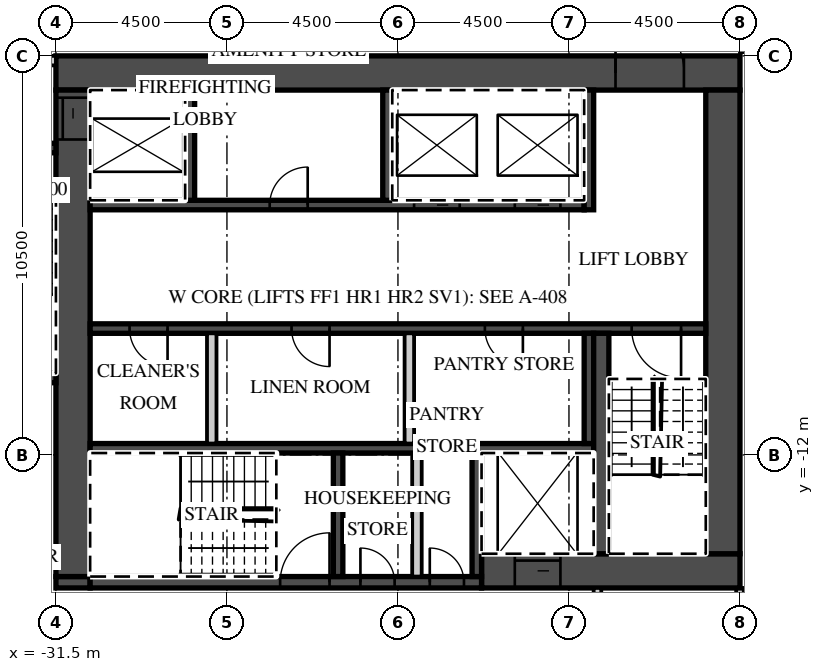
"""IFC4 building model, lengths in metres.
Left out: names, types, materials, properties, quantities, classifications, styles, units other than length and angle.
Written with IfcOpenShell. Run it as: python <this file> out.ifc"""

import sys

from ifc_helpers import new_model, si_unit, direction, frame, frame_2d, origin, place, context, subcontext, project, spatial, rectangle, extrude, element, fill, save


model = new_model("IFC4")
c1 = context("Model", 3, precision=1e-05, world=origin(), true_north=direction((0.0, 1.0)))
c2 = subcontext(c1, "Body", "Model", "MODEL_VIEW")
j1 = project(units=[si_unit("LENGTHUNIT", "METRE"), si_unit("PLANEANGLEUNIT", "RADIAN")], contexts=[c1])
p1 = place(None, origin())
s1 = spatial("IfcSite", under=j1, at=p1, CompositionType="ELEMENT")
p2 = place(p1, origin())
s2 = spatial("IfcBuilding", under=s1, at=p2, CompositionType="ELEMENT")
p3 = place(p2, frame((0.0, 0.0, 301.5)))
s3 = spatial("IfcBuildingStorey", under=s2, at=p3, CompositionType="ELEMENT", Elevation=301.5)
p4 = place(p3, frame((-13.5, -21.396, 0.0), z_axis=(0.0, 0.0, 1.0), x_axis=(0.0, 1.0, 0.0)))
e1 = element("IfcWall", 1, at=p4, inside=s3, PredefinedType="PARTITIONING", context=c2, shape_type="SweptSolid", body=[
    extrude(rectangle(XDim=5.896, YDim=0.2, at=frame_2d((2.948, 0.0))), origin(), (0.0, 0.0, 1.0), 3.02),
])
p5 = place(p3, frame((-13.5, -1.3, 0.0), z_axis=(0.0, 0.0, 1.0), x_axis=(1.0, 0.0, 0.0)))
e2 = element("IfcWall", 2, at=p5, inside=s3, PredefinedType="PARTITIONING", context=c2, shape_type="SweptSolid", body=[
    extrude(rectangle(XDim=50.293, YDim=0.2, at=frame_2d((25.146, 0.0))), origin(), (0.0, 0.0, 1.0), 3.02),
])
p6 = place(p5, frame((0.575, 0.0, 0.0)))
e3 = element("IfcOpeningElement", 3, at=p6, cuts=e2, PredefinedType="OPENING", context=c2, shape_type="SweptSolid", body=[
    extrude(rectangle(XDim=1.0, YDim=2.1, at=frame_2d((0.5, 1.05))), frame((0.0, 0.11, 0.0), z_axis=(0.0, -1.0, 0.0), x_axis=(1.0, 0.0, 0.0)), (0.0, 0.0, 1.0), 0.22),
])
p7 = place(p5, frame((6.938, 0.0, 0.0)))
e4 = element("IfcOpeningElement", 4, at=p7, cuts=e2, PredefinedType="OPENING", context=c2, shape_type="SweptSolid", body=[
    extrude(rectangle(XDim=1.2, YDim=2.1, at=frame_2d((0.6, 1.05))), frame((0.0, 0.11, 0.0), z_axis=(0.0, -1.0, 0.0), x_axis=(1.0, 0.0, 0.0)), (0.0, 0.0, 1.0), 0.22),
])
p8 = place(p5, frame((16.45, 0.0, 0.0)))
e5 = element("IfcOpeningElement", 5, at=p8, cuts=e2, PredefinedType="OPENING", context=c2, shape_type="SweptSolid", body=[
    extrude(rectangle(XDim=1.0, YDim=2.1, at=frame_2d((0.5, 1.05))), frame((0.0, 0.11, 0.0), z_axis=(0.0, -1.0, 0.0), x_axis=(1.0, 0.0, 0.0)), (0.0, 0.0, 1.0), 0.22),
])
p9 = place(p5, frame((20.925, 0.0, 0.0)))
e6 = element("IfcOpeningElement", 6, at=p9, cuts=e2, PredefinedType="OPENING", context=c2, shape_type="SweptSolid", body=[
    extrude(rectangle(XDim=1.0, YDim=2.1, at=frame_2d((0.5, 1.05))), frame((0.0, 0.11, 0.0), z_axis=(0.0, -1.0, 0.0), x_axis=(1.0, 0.0, 0.0)), (0.0, 0.0, 1.0), 0.22),
])
p10 = place(p5, frame((24.938, 0.0, 0.0)))
e7 = element("IfcOpeningElement", 7, at=p10, cuts=e2, PredefinedType="OPENING", context=c2, shape_type="SweptSolid", body=[
    extrude(rectangle(XDim=1.2, YDim=2.1, at=frame_2d((0.6, 1.05))), frame((0.0, 0.11, 0.0), z_axis=(0.0, -1.0, 0.0), x_axis=(1.0, 0.0, 0.0)), (0.0, 0.0, 1.0), 0.22),
])
p11 = place(p5, frame((32.075, 0.0, 0.0)))
e8 = element("IfcOpeningElement", 8, at=p11, cuts=e2, PredefinedType="OPENING", context=c2, shape_type="SweptSolid", body=[
    extrude(rectangle(XDim=1.0, YDim=2.1, at=frame_2d((0.5, 1.05))), frame((0.0, 0.11, 0.0), z_axis=(0.0, -1.0, 0.0), x_axis=(1.0, 0.0, 0.0)), (0.0, 0.0, 1.0), 0.22),
])
p12 = place(p5, frame((38.925, 0.0, 0.0)))
e9 = element("IfcOpeningElement", 9, at=p12, cuts=e2, PredefinedType="OPENING", context=c2, shape_type="SweptSolid", body=[
    extrude(rectangle(XDim=1.0, YDim=2.1, at=frame_2d((0.5, 1.05))), frame((0.0, 0.11, 0.0), z_axis=(0.0, -1.0, 0.0), x_axis=(1.0, 0.0, 0.0)), (0.0, 0.0, 1.0), 0.22),
])
p13 = place(p5, frame((45.862, 0.0, 0.0)))
e10 = element("IfcOpeningElement", 10, at=p13, cuts=e2, PredefinedType="OPENING", context=c2, shape_type="SweptSolid", body=[
    extrude(rectangle(XDim=1.2, YDim=2.1, at=frame_2d((0.6, 1.05))), frame((0.0, 0.11, 0.0), z_axis=(0.0, -1.0, 0.0), x_axis=(1.0, 0.0, 0.0)), (0.0, 0.0, 1.0), 0.22),
])
p14 = place(p3, frame((-31.5, -1.95, 0.0), z_axis=(0.0, 0.0, 1.0), x_axis=(1.0, 0.0, 0.0)))
e11 = element("IfcWall", 11, at=p14, inside=s3, PredefinedType="SHEAR", context=c2, shape_type="SweptSolid", body=[
    extrude(rectangle(XDim=18.0, YDim=0.9, at=frame_2d((9.0, 0.0))), origin(), (0.0, 0.0, 1.0), 3.02),
])
p15 = place(p14, frame((14.725, 0.0, 0.0)))
e12 = element("IfcOpeningElement", 12, at=p15, cuts=e11, PredefinedType="OPENING", context=c2, shape_type="SweptSolid", body=[
    extrude(rectangle(XDim=1.8, YDim=2.1, at=frame_2d((0.9, 1.05))), frame((0.0, 0.46, 0.0), z_axis=(0.0, -1.0, 0.0), x_axis=(1.0, 0.0, 0.0)), (0.0, 0.0, 1.0), 0.92),
])
p16 = place(p3, frame((-20.3, -15.05, 0.0), z_axis=(0.0, 0.0, 1.0), x_axis=(1.0, 0.0, 0.0)))
e13 = element("IfcWall", 13, at=p16, inside=s3, PredefinedType="SHEAR", context=c2, shape_type="SweptSolid", body=[
    extrude(rectangle(XDim=6.8, YDim=0.9, at=frame_2d((3.4, 0.0))), origin(), (0.0, 0.0, 1.0), 3.02),
])
p17 = place(p16, frame((0.875, 0.0, 0.0)))
e14 = element("IfcOpeningElement", 14, at=p17, cuts=e13, PredefinedType="OPENING", context=c2, shape_type="SweptSolid", body=[
    extrude(rectangle(XDim=1.2, YDim=2.1, at=frame_2d((0.6, 1.05))), frame((0.0, 0.46, 0.0), z_axis=(0.0, -1.0, 0.0), x_axis=(1.0, 0.0, 0.0)), (0.0, 0.0, 1.0), 0.92),
])
p18 = place(p3, frame((-31.5, -15.35, 0.0), z_axis=(0.0, 0.0, 1.0), x_axis=(1.0, 0.0, 0.0)))
e15 = element("IfcWall", 15, at=p18, inside=s3, PredefinedType="SHEAR", context=c2, shape_type="SweptSolid", body=[
    extrude(rectangle(XDim=0.9, YDim=0.3, at=frame_2d((0.45, 0.0))), origin(), (0.0, 0.0, 1.0), 3.02),
])
p19 = place(p3, frame((-30.6, -15.35, 0.0), z_axis=(0.0, 0.0, 1.0), x_axis=(1.0, 0.0, 0.0)))
e16 = element("IfcWall", 16, at=p19, inside=s3, PredefinedType="SHEAR", context=c2, shape_type="SweptSolid", body=[
    extrude(rectangle(XDim=10.3, YDim=0.3, at=frame_2d((5.15, 0.0))), origin(), (0.0, 0.0, 1.0), 3.02),
])
p20 = place(p19, frame((5.0, 0.0, 0.0)))
e17 = element("IfcOpeningElement", 17, at=p20, cuts=e16, PredefinedType="OPENING", context=c2, shape_type="SweptSolid", body=[
    extrude(rectangle(XDim=1.3, YDim=2.1, at=frame_2d((0.65, 1.05))), frame((0.0, 0.16, 0.0), z_axis=(0.0, -1.0, 0.0), x_axis=(1.0, 0.0, 0.0)), (0.0, 0.0, 1.0), 0.32),
])
p21 = place(p19, frame((7.113, 0.0, 0.0)))
e18 = element("IfcOpeningElement", 18, at=p21, cuts=e16, PredefinedType="OPENING", context=c2, shape_type="SweptSolid", body=[
    extrude(rectangle(XDim=0.9, YDim=2.1, at=frame_2d((0.45, 1.05))), frame((0.0, 0.16, 0.0), z_axis=(0.0, -1.0, 0.0), x_axis=(1.0, 0.0, 0.0)), (0.0, 0.0, 1.0), 0.32),
])
p22 = place(p19, frame((8.938, 0.0, 0.0)))
e19 = element("IfcOpeningElement", 19, at=p22, cuts=e16, PredefinedType="OPENING", context=c2, shape_type="SweptSolid", body=[
    extrude(rectangle(XDim=0.9, YDim=2.1, at=frame_2d((0.45, 1.05))), frame((0.0, 0.16, 0.0), z_axis=(0.0, -1.0, 0.0), x_axis=(1.0, 0.0, 0.0)), (0.0, 0.0, 1.0), 0.32),
])
p23 = place(p3, frame((-31.05, -15.2, 0.0), z_axis=(0.0, 0.0, 1.0), x_axis=(0.0, 1.0, 0.0)))
e20 = element("IfcWall", 20, at=p23, inside=s3, PredefinedType="SHEAR", context=c2, shape_type="SweptSolid", body=[
    extrude(rectangle(XDim=12.8, YDim=0.9, at=frame_2d((6.4, 0.0))), origin(), (0.0, 0.0, 1.0), 3.02),
])
p24 = place(p23, frame((11.5, 0.0, 0.0)))
e21 = element("IfcOpeningElement", 21, at=p24, cuts=e20, PredefinedType="OPENING", context=c2, shape_type="SweptSolid", body=[
    extrude(rectangle(XDim=1.1, YDim=2.1, at=frame_2d((0.55, 1.05))), frame((0.0, 0.46, 0.0), z_axis=(0.0, -1.0, 0.0), x_axis=(1.0, 0.0, 0.0)), (0.0, 0.0, 1.0), 0.92),
])
p25 = place(p3, frame((-13.95, -14.6, 0.0), z_axis=(0.0, 0.0, 1.0), x_axis=(0.0, 1.0, 0.0)))
e22 = element("IfcWall", 22, at=p25, inside=s3, PredefinedType="SHEAR", context=c2, shape_type="SweptSolid", body=[
    extrude(rectangle(XDim=12.2, YDim=0.9, at=frame_2d((6.1, 0.0))), origin(), (0.0, 0.0, 1.0), 3.02),
])
p26 = place(p3, frame((-30.6, -5.425, 0.0), z_axis=(0.0, 0.0, 1.0), x_axis=(1.0, 0.0, 0.0)))
e23 = element("IfcWall", 23, at=p26, inside=s3, PredefinedType="SHEAR", context=c2, shape_type="SweptSolid", body=[
    extrude(rectangle(XDim=13.0, YDim=0.25, at=frame_2d((6.5, 0.0))), origin(), (0.0, 0.0, 1.0), 3.02),
])
p27 = place(p26, frame((8.525, 0.0, 0.0)))
e24 = element("IfcOpeningElement", 24, at=p27, cuts=e23, PredefinedType="OPENING", context=c2, shape_type="SweptSolid", body=[
    extrude(rectangle(XDim=1.2, YDim=2.1, at=frame_2d((0.6, 1.05))), frame((0.0, 0.135, 0.0), z_axis=(0.0, -1.0, 0.0), x_axis=(1.0, 0.0, 0.0)), (0.0, 0.0, 1.0), 0.27),
])
p28 = place(p26, frame((11.175, 0.0, 0.0)))
e25 = element("IfcOpeningElement", 25, at=p28, cuts=e23, PredefinedType="OPENING", context=c2, shape_type="SweptSolid", body=[
    extrude(rectangle(XDim=1.2, YDim=2.1, at=frame_2d((0.6, 1.05))), frame((0.0, 0.135, 0.0), z_axis=(0.0, -1.0, 0.0), x_axis=(1.0, 0.0, 0.0)), (0.0, 0.0, 1.0), 0.27),
])
p29 = place(p26, frame((4.725, 0.0, 0.0)))
e26 = element("IfcOpeningElement", 26, at=p29, cuts=e23, PredefinedType="OPENING", context=c2, shape_type="SweptSolid", body=[
    extrude(rectangle(XDim=1.0, YDim=2.1, at=frame_2d((0.5, 1.05))), frame((0.0, 0.135, 0.0), z_axis=(0.0, -1.0, 0.0), x_axis=(1.0, 0.0, 0.0)), (0.0, 0.0, 1.0), 0.27),
])
p30 = place(p3, frame((-17.475, -5.55, 0.0), z_axis=(0.0, 0.0, 1.0), x_axis=(0.0, 1.0, 0.0)))
e27 = element("IfcWall", 27, at=p30, inside=s3, PredefinedType="SHEAR", context=c2, shape_type="SweptSolid", body=[
    extrude(rectangle(XDim=3.15, YDim=0.25, at=frame_2d((1.575, 0.0))), origin(), (0.0, 0.0, 1.0), 3.02),
])
for number, where, z_axis, x_axis in (
    (28, (-27.975, -5.3, 0.0), (0.0, 0.0, 1.0), (0.0, 1.0, 0.0)),
    (29, (-22.775, -5.3, 0.0), (0.0, 0.0, 1.0), (0.0, 1.0, 0.0)),
):
    element("IfcWall", number, at=place(p3, frame(where, z_axis=z_axis, x_axis=x_axis)), inside=s3, PredefinedType="SHEAR", context=c2, shape_type="SweptSolid", body=[
        extrude(rectangle(XDim=2.9, YDim=0.25, at=frame_2d((1.45, 0.0))), origin(), (0.0, 0.0, 1.0), 3.02),
    ])
p31 = place(p3, frame((-30.6, -8.675, 0.0), z_axis=(0.0, 0.0, 1.0), x_axis=(1.0, 0.0, 0.0)))
e30 = element("IfcWall", 30, at=p31, inside=s3, PredefinedType="SHEAR", context=c2, shape_type="SweptSolid", body=[
    extrude(rectangle(XDim=16.2, YDim=0.25, at=frame_2d((8.1, 0.0))), origin(), (0.0, 0.0, 1.0), 3.02),
])
p32 = place(p31, frame((14.25, 0.0, 0.0)))
e31 = element("IfcOpeningElement", 31, at=p32, cuts=e30, PredefinedType="OPENING", context=c2, shape_type="SweptSolid", body=[
    extrude(rectangle(XDim=1.3, YDim=2.1, at=frame_2d((0.65, 1.05))), frame((0.0, 0.135, 0.0), z_axis=(0.0, -1.0, 0.0), x_axis=(1.0, 0.0, 0.0)), (0.0, 0.0, 1.0), 0.27),
])
p33 = place(p31, frame((1.038, 0.0, 0.0)))
e32 = element("IfcOpeningElement", 32, at=p33, cuts=e30, PredefinedType="OPENING", context=c2, shape_type="SweptSolid", body=[
    extrude(rectangle(XDim=1.0, YDim=2.1, at=frame_2d((0.5, 1.05))), frame((0.0, 0.135, 0.0), z_axis=(0.0, -1.0, 0.0), x_axis=(1.0, 0.0, 0.0)), (0.0, 0.0, 1.0), 0.27),
])
p34 = place(p31, frame((5.3, 0.0, 0.0)))
e33 = element("IfcOpeningElement", 33, at=p34, cuts=e30, PredefinedType="OPENING", context=c2, shape_type="SweptSolid", body=[
    extrude(rectangle(XDim=1.0, YDim=2.1, at=frame_2d((0.5, 1.05))), frame((0.0, 0.135, 0.0), z_axis=(0.0, -1.0, 0.0), x_axis=(1.0, 0.0, 0.0)), (0.0, 0.0, 1.0), 0.27),
])
p35 = place(p31, frame((10.387, 0.0, 0.0)))
e34 = element("IfcOpeningElement", 34, at=p35, cuts=e30, PredefinedType="OPENING", context=c2, shape_type="SweptSolid", body=[
    extrude(rectangle(XDim=1.0, YDim=2.1, at=frame_2d((0.5, 1.05))), frame((0.0, 0.135, 0.0), z_axis=(0.0, -1.0, 0.0), x_axis=(1.0, 0.0, 0.0)), (0.0, 0.0, 1.0), 0.27),
])
p36 = place(p3, frame((-30.6, -11.825, 0.0), z_axis=(0.0, 0.0, 1.0), x_axis=(1.0, 0.0, 0.0)))
e35 = element("IfcWall", 35, at=p36, inside=s3, PredefinedType="SHEAR", context=c2, shape_type="SweptSolid", body=[
    extrude(rectangle(XDim=13.25, YDim=0.25, at=frame_2d((6.625, 0.0))), origin(), (0.0, 0.0, 1.0), 3.02),
])
p37 = place(p3, frame((-17.475, -11.7, 0.0), z_axis=(0.0, 0.0, 1.0), x_axis=(0.0, 1.0, 0.0)))
e36 = element("IfcWall", 36, at=p37, inside=s3, PredefinedType="SHEAR", context=c2, shape_type="SweptSolid", body=[
    extrude(rectangle(XDim=2.9, YDim=0.25, at=frame_2d((1.45, 0.0))), origin(), (0.0, 0.0, 1.0), 3.02),
])
for number, where, z_axis, x_axis in (
    (37, (-27.4, -11.7, 0.0), (0.0, 0.0, 1.0), (0.0, 1.0, 0.0)),
    (38, (-22.2, -11.7, 0.0), (0.0, 0.0, 1.0), (0.0, 1.0, 0.0)),
):
    element("IfcWall", number, at=place(p3, frame(where, z_axis=z_axis, x_axis=x_axis)), inside=s3, PredefinedType="PARTITIONING", context=c2, shape_type="SweptSolid", body=[
        extrude(rectangle(XDim=2.9, YDim=0.25, at=frame_2d((1.45, 0.0))), origin(), (0.0, 0.0, 1.0), 3.02),
    ])
p38 = place(p3, frame((-17.15, -14.6, 0.0), z_axis=(0.0, 0.0, 1.0), x_axis=(0.0, 1.0, 0.0)))
e39 = element("IfcWall", 39, at=p38, inside=s3, PredefinedType="SHEAR", context=c2, shape_type="SweptSolid", body=[
    extrude(rectangle(XDim=5.8, YDim=0.4, at=frame_2d((2.9, 0.0))), origin(), (0.0, 0.0, 1.0), 3.02),
])
for number, where, z_axis, x_axis in (
    (40, (-20.425, -15.2, 0.0), (0.0, 0.0, 1.0), (0.0, 1.0, 0.0)),
    (41, (-24.075, -15.2, 0.0), (0.0, 0.0, 1.0), (0.0, 1.0, 0.0)),
):
    element("IfcWall", number, at=place(p3, frame(where, z_axis=z_axis, x_axis=x_axis)), inside=s3, PredefinedType="SHEAR", context=c2, shape_type="SweptSolid", body=[
        extrude(rectangle(XDim=3.25, YDim=0.25, at=frame_2d((1.625, 0.0))), origin(), (0.0, 0.0, 1.0), 3.02),
    ])
p39 = place(p3, frame((-22.0, -15.2, 0.0), z_axis=(0.0, 0.0, 1.0), x_axis=(0.0, 1.0, 0.0)))
e42 = element("IfcWall", 42, at=p39, inside=s3, PredefinedType="PARTITIONING", context=c2, shape_type="SweptSolid", body=[
    extrude(rectangle(XDim=3.25, YDim=0.25, at=frame_2d((1.625, 0.0))), origin(), (0.0, 0.0, 1.0), 3.02),
])
p40 = place(p3, frame((-39.627, -1.625, 0.0), z_axis=(0.0, 0.0, 1.0), x_axis=(1.0, 0.0, 0.0)))
e43 = element("IfcWall", 43, at=p40, inside=s3, PredefinedType="PARTITIONING", context=c2, shape_type="SweptSolid", body=[
    extrude(rectangle(XDim=8.127, YDim=0.25, at=frame_2d((4.063, 0.0))), origin(), (0.0, 0.0, 1.0), 3.02),
])
p41 = place(p40, frame((6.202, 0.0, 0.0)))
e44 = element("IfcOpeningElement", 44, at=p41, cuts=e43, PredefinedType="OPENING", context=c2, shape_type="SweptSolid", body=[
    extrude(rectangle(XDim=1.3, YDim=2.1, at=frame_2d((0.65, 1.05))), frame((0.0, 0.135, 0.0), z_axis=(0.0, -1.0, 0.0), x_axis=(1.0, 0.0, 0.0)), (0.0, 0.0, 1.0), 0.27),
])
p42 = place(p40, frame((3.777, 0.0, 0.0)))
e45 = element("IfcOpeningElement", 45, at=p42, cuts=e43, PredefinedType="OPENING", context=c2, shape_type="SweptSolid", body=[
    extrude(rectangle(XDim=1.1, YDim=2.1, at=frame_2d((0.55, 1.05))), frame((0.0, 0.135, 0.0), z_axis=(0.0, -1.0, 0.0), x_axis=(1.0, 0.0, 0.0)), (0.0, 0.0, 1.0), 0.27),
])
p43 = place(p3, frame((-34.05, -3.925, 0.0), z_axis=(0.0, 0.0, 1.0), x_axis=(1.0, 0.0, 0.0)))
e46 = element("IfcWall", 46, at=p43, inside=s3, PredefinedType="SHEAR", context=c2, shape_type="SweptSolid", body=[
    extrude(rectangle(XDim=2.55, YDim=0.25, at=frame_2d((1.275, 0.0))), origin(), (0.0, 0.0, 1.0), 3.02),
])
p44 = place(p43, frame((0.625, 0.0, 0.0)))
e47 = element("IfcOpeningElement", 47, at=p44, cuts=e46, PredefinedType="OPENING", context=c2, shape_type="SweptSolid", body=[
    extrude(rectangle(XDim=1.3, YDim=2.1, at=frame_2d((0.65, 1.05))), frame((0.0, 0.135, 0.0), z_axis=(0.0, -1.0, 0.0), x_axis=(1.0, 0.0, 0.0)), (0.0, 0.0, 1.0), 0.27),
])
p45 = place(p3, frame((-34.05, -9.975, 0.0), z_axis=(0.0, 0.0, 1.0), x_axis=(1.0, 0.0, 0.0)))
e48 = element("IfcWall", 48, at=p45, inside=s3, PredefinedType="SHEAR", context=c2, shape_type="SweptSolid", body=[
    extrude(rectangle(XDim=2.55, YDim=0.25, at=frame_2d((1.275, 0.0))), origin(), (0.0, 0.0, 1.0), 3.02),
])
p46 = place(p3, frame((-17.25, -17.7, 0.0), z_axis=(0.0, 0.0, 1.0), x_axis=(0.0, 1.0, 0.0)))
e49 = element("IfcWall", 49, at=p46, inside=s3, PredefinedType="PARTITIONING", context=c2, shape_type="SweptSolid", body=[
    extrude(rectangle(XDim=2.2, YDim=0.2, at=frame_2d((1.1, 0.0))), origin(), (0.0, 0.0, 1.0), 3.02),
])
p47 = place(p27, origin())
e50 = element("IfcDoor", 50, at=p47, inside=s3, OperationType="SLIDING_TO_LEFT", PredefinedType="DOOR", context=c2, shape_type="SweptSolid", body=[
    extrude(rectangle(XDim=1.2, YDim=2.1, at=frame_2d((0.6, 1.05))), frame((0.0, 0.025, 0.0), z_axis=(0.0, -1.0, 0.0), x_axis=(1.0, 0.0, 0.0)), (0.0, 0.0, 1.0), 0.05),
])
fill(e24, e50)
p48 = place(p28, origin())
e51 = element("IfcDoor", 51, at=p48, inside=s3, OperationType="SLIDING_TO_RIGHT", PredefinedType="DOOR", context=c2, shape_type="SweptSolid", body=[
    extrude(rectangle(XDim=1.2, YDim=2.1, at=frame_2d((0.6, 1.05))), frame((0.0, 0.025, 0.0), z_axis=(0.0, -1.0, 0.0), x_axis=(1.0, 0.0, 0.0)), (0.0, 0.0, 1.0), 0.05),
])
fill(e25, e51)
p49 = place(p17, origin())
e52 = element("IfcDoor", 52, at=p49, inside=s3, OperationType="SLIDING_TO_LEFT", PredefinedType="DOOR", context=c2, shape_type="SweptSolid", body=[
    extrude(rectangle(XDim=1.2, YDim=2.1, at=frame_2d((0.6, 1.05))), frame((0.0, 0.025, 0.0), z_axis=(0.0, -1.0, 0.0), x_axis=(1.0, 0.0, 0.0)), (0.0, 0.0, 1.0), 0.05),
])
fill(e14, e52)
p50 = place(p24, origin())
e53 = element("IfcDoor", 53, at=p50, inside=s3, OperationType="SLIDING_TO_RIGHT", PredefinedType="DOOR", context=c2, shape_type="SweptSolid", body=[
    extrude(rectangle(XDim=1.1, YDim=2.1, at=frame_2d((0.55, 1.05))), frame((0.0, 0.025, 0.0), z_axis=(0.0, -1.0, 0.0), x_axis=(1.0, 0.0, 0.0)), (0.0, 0.0, 1.0), 0.05),
])
fill(e21, e53)
p51 = place(p15, origin())
e54 = element("IfcDoor", 54, at=p51, inside=s3, OperationType="DOUBLE_DOOR_DOUBLE_SWING", PredefinedType="DOOR", context=c2, shape_type="SweptSolid", body=[
    extrude(rectangle(XDim=1.8, YDim=2.1, at=frame_2d((0.9, 1.05))), frame((0.0, 0.025, 0.0), z_axis=(0.0, -1.0, 0.0), x_axis=(1.0, 0.0, 0.0)), (0.0, 0.0, 1.0), 0.05),
])
fill(e12, e54)
p52 = place(p32, origin())
e55 = element("IfcDoor", 55, at=p52, inside=s3, OperationType="SINGLE_SWING_RIGHT", PredefinedType="DOOR", context=c2, shape_type="SweptSolid", body=[
    extrude(rectangle(XDim=1.3, YDim=2.1, at=frame_2d((0.65, 1.05))), frame((0.0, 0.025, 0.0), z_axis=(0.0, -1.0, 0.0), x_axis=(1.0, 0.0, 0.0)), (0.0, 0.0, 1.0), 0.05),
])
fill(e31, e55)
p53 = place(p20, origin())
e56 = element("IfcDoor", 56, at=p53, inside=s3, OperationType="SINGLE_SWING_RIGHT", PredefinedType="DOOR", context=c2, shape_type="SweptSolid", body=[
    extrude(rectangle(XDim=1.3, YDim=2.1, at=frame_2d((0.65, 1.05))), frame((0.0, 0.025, 0.0), z_axis=(0.0, -1.0, 0.0), x_axis=(1.0, 0.0, 0.0)), (0.0, 0.0, 1.0), 0.05),
])
fill(e17, e56)
p54 = place(p21, origin())
e57 = element("IfcDoor", 57, at=p54, inside=s3, OperationType="SINGLE_SWING_LEFT", PredefinedType="DOOR", context=c2, shape_type="SweptSolid", body=[
    extrude(rectangle(XDim=0.9, YDim=2.1, at=frame_2d((0.45, 1.05))), frame((0.0, 0.025, 0.0), z_axis=(0.0, -1.0, 0.0), x_axis=(1.0, 0.0, 0.0)), (0.0, 0.0, 1.0), 0.05),
])
fill(e18, e57)
p55 = place(p22, origin())
e58 = element("IfcDoor", 58, at=p55, inside=s3, OperationType="SINGLE_SWING_LEFT", PredefinedType="DOOR", context=c2, shape_type="SweptSolid", body=[
    extrude(rectangle(XDim=0.9, YDim=2.1, at=frame_2d((0.45, 1.05))), frame((0.0, 0.025, 0.0), z_axis=(0.0, -1.0, 0.0), x_axis=(1.0, 0.0, 0.0)), (0.0, 0.0, 1.0), 0.05),
])
fill(e19, e58)
p56 = place(p33, origin())
e59 = element("IfcDoor", 59, at=p56, inside=s3, OperationType="SINGLE_SWING_RIGHT", PredefinedType="DOOR", context=c2, shape_type="SweptSolid", body=[
    extrude(rectangle(XDim=1.0, YDim=2.1, at=frame_2d((0.5, 1.05))), frame((0.0, 0.025, 0.0), z_axis=(0.0, -1.0, 0.0), x_axis=(1.0, 0.0, 0.0)), (0.0, 0.0, 1.0), 0.05),
])
fill(e32, e59)
p57 = place(p34, origin())
e60 = element("IfcDoor", 60, at=p57, inside=s3, OperationType="SINGLE_SWING_RIGHT", PredefinedType="DOOR", context=c2, shape_type="SweptSolid", body=[
    extrude(rectangle(XDim=1.0, YDim=2.1, at=frame_2d((0.5, 1.05))), frame((0.0, 0.025, 0.0), z_axis=(0.0, -1.0, 0.0), x_axis=(1.0, 0.0, 0.0)), (0.0, 0.0, 1.0), 0.05),
])
fill(e33, e60)
p58 = place(p35, origin())
e61 = element("IfcDoor", 61, at=p58, inside=s3, OperationType="SINGLE_SWING_RIGHT", PredefinedType="DOOR", context=c2, shape_type="SweptSolid", body=[
    extrude(rectangle(XDim=1.0, YDim=2.1, at=frame_2d((0.5, 1.05))), frame((0.0, 0.025, 0.0), z_axis=(0.0, -1.0, 0.0), x_axis=(1.0, 0.0, 0.0)), (0.0, 0.0, 1.0), 0.05),
])
fill(e34, e61)
p59 = place(p29, origin())
e62 = element("IfcDoor", 62, at=p59, inside=s3, OperationType="SINGLE_SWING_RIGHT", PredefinedType="DOOR", context=c2, shape_type="SweptSolid", body=[
    extrude(rectangle(XDim=1.0, YDim=2.1, at=frame_2d((0.5, 1.05))), frame((0.0, 0.025, 0.0), z_axis=(0.0, -1.0, 0.0), x_axis=(1.0, 0.0, 0.0)), (0.0, 0.0, 1.0), 0.05),
])
fill(e26, e62)
save(model, sys.argv[1])
